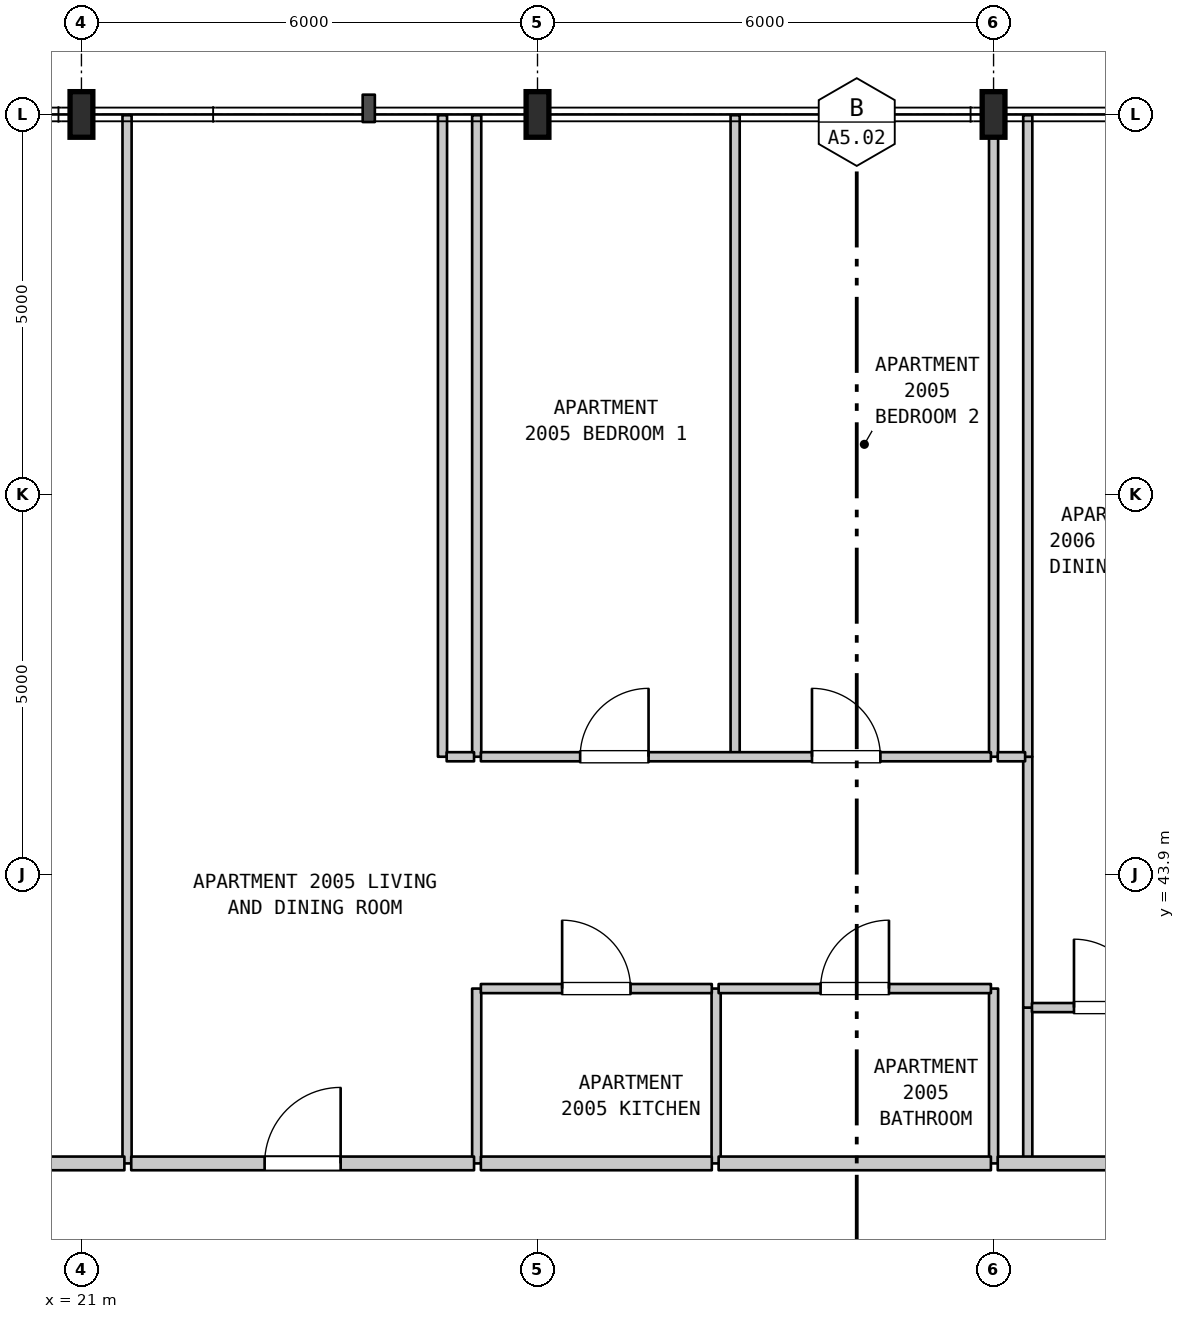
"""IFC4 building model, lengths in metres.
Left out: names, types, materials, properties, quantities, classifications, styles, units other than length and angle.
Written with IfcOpenShell. Run it as: python <this file> out.ifc"""

import sys

from ifc_helpers import new_model, si_unit, direction, frame, frame_2d, origin, origin_2d, place, context, subcontext, project, spatial, rectangle, i_section, extrude, element, fill, save


model = new_model("IFC4")
c1 = context("Model", 3, precision=1e-05, world=origin(), true_north=direction((0.0, 1.0)))
c2 = subcontext(c1, "Body", "Model", "MODEL_VIEW")
j1 = project(units=[si_unit("LENGTHUNIT", "METRE"), si_unit("PLANEANGLEUNIT", "RADIAN")], contexts=[c1])
p1 = place(None, origin())
s1 = spatial("IfcSite", under=j1, at=p1, CompositionType="ELEMENT")
p2 = place(p1, origin())
s2 = spatial("IfcBuilding", under=s1, at=p2, CompositionType="ELEMENT")
p3 = place(p2, frame((0.0, 0.0, 86.4)))
s3 = spatial("IfcBuildingStorey", under=s2, at=p3, CompositionType="ELEMENT", Elevation=86.4)
for number, where, z_axis, x_axis in (
    (1, (21.0, 53.9, 0.0), (0.0, 0.0, 1.0), (1.0, 0.0, 0.0)),
    (2, (27.0, 53.9, 0.0), (0.0, 0.0, 1.0), (1.0, 0.0, 0.0)),
    (3, (33.0, 53.9, 0.0), (0.0, 0.0, 1.0), (1.0, 0.0, 0.0)),
):
    element("IfcColumn", number, at=place(p3, frame(where, z_axis=z_axis, x_axis=x_axis)), inside=s3, PredefinedType="COLUMN", context=c2, shape_type="SweptSolid", body=[
        extrude(i_section(OverallWidth=0.3, OverallDepth=0.6, WebThickness=0.015, FlangeThickness=0.03, FilletRadius=0.027, at=origin_2d()), origin(), (0.0, 0.0, 1.0), 4.5),
    ])
p4 = place(p3, frame((21.6, 40.1, 0.0), z_axis=(0.0, 0.0, 1.0), x_axis=(0.0, 1.0, 0.0)))
e4 = element("IfcWall", 4, at=p4, inside=s3, PredefinedType="PARTITIONING", context=c2, shape_type="SweptSolid", body=[
    extrude(rectangle(XDim=13.79, YDim=0.12, at=frame_2d((6.895, 0.0))), origin(), (0.0, 0.0, 1.0), 4.185),
])
p5 = place(p3, frame((25.75, 45.45, 0.0), z_axis=(0.0, 0.0, 1.0), x_axis=(0.0, 1.0, 0.0)))
e5 = element("IfcWall", 5, at=p5, inside=s3, PredefinedType="PARTITIONING", context=c2, shape_type="SweptSolid", body=[
    extrude(rectangle(XDim=8.44, YDim=0.12, at=frame_2d((4.22, 0.0))), origin(), (0.0, 0.0, 1.0), 4.185),
])
p6 = place(p3, frame((26.2, 40.1, 0.0), z_axis=(0.0, 0.0, 1.0), x_axis=(0.0, 1.0, 0.0)))
e6 = element("IfcWall", 6, at=p6, inside=s3, PredefinedType="PARTITIONING", context=c2, shape_type="SweptSolid", body=[
    extrude(rectangle(XDim=2.3, YDim=0.12, at=frame_2d((1.15, 0.0))), origin(), (0.0, 0.0, 1.0), 4.185),
])
p7 = place(p3, frame((26.2, 45.45, 0.0), z_axis=(0.0, 0.0, 1.0), x_axis=(0.0, 1.0, 0.0)))
e7 = element("IfcWall", 7, at=p7, inside=s3, PredefinedType="PARTITIONING", context=c2, shape_type="SweptSolid", body=[
    extrude(rectangle(XDim=8.44, YDim=0.12, at=frame_2d((4.22, 0.0))), origin(), (0.0, 0.0, 1.0), 4.185),
])
p8 = place(p3, frame((29.35, 40.1, 0.0), z_axis=(0.0, 0.0, 1.0), x_axis=(0.0, 1.0, 0.0)))
e8 = element("IfcWall", 8, at=p8, inside=s3, PredefinedType="PARTITIONING", context=c2, shape_type="SweptSolid", body=[
    extrude(rectangle(XDim=2.3, YDim=0.12, at=frame_2d((1.15, 0.0))), origin(), (0.0, 0.0, 1.0), 4.185),
])
p9 = place(p3, frame((29.6, 45.45, 0.0), z_axis=(0.0, 0.0, 1.0), x_axis=(0.0, 1.0, 0.0)))
e9 = element("IfcWall", 9, at=p9, inside=s3, PredefinedType="PARTITIONING", context=c2, shape_type="SweptSolid", body=[
    extrude(rectangle(XDim=8.44, YDim=0.12, at=frame_2d((4.22, 0.0))), origin(), (0.0, 0.0, 1.0), 4.185),
])
p10 = place(p3, frame((33.0, 40.1, 0.0), z_axis=(0.0, 0.0, 1.0), x_axis=(0.0, 1.0, 0.0)))
e10 = element("IfcWall", 10, at=p10, inside=s3, PredefinedType="PARTITIONING", context=c2, shape_type="SweptSolid", body=[
    extrude(rectangle(XDim=2.3, YDim=0.12, at=frame_2d((1.15, 0.0))), origin(), (0.0, 0.0, 1.0), 3.585),
])
p11 = place(p3, frame((33.0, 45.45, 0.0), z_axis=(0.0, 0.0, 1.0), x_axis=(0.0, 1.0, 0.0)))
e11 = element("IfcWall", 11, at=p11, inside=s3, PredefinedType="PARTITIONING", context=c2, shape_type="SweptSolid", body=[
    extrude(rectangle(XDim=8.44, YDim=0.12, at=frame_2d((4.22, 0.0))), origin(), (0.0, 0.0, 1.0), 3.585),
])
p12 = place(p3, frame((33.45, 40.1, 0.0), z_axis=(0.0, 0.0, 1.0), x_axis=(0.0, 1.0, 0.0)))
e12 = element("IfcWall", 12, at=p12, inside=s3, PredefinedType="PARTITIONING", context=c2, shape_type="SweptSolid", body=[
    extrude(rectangle(XDim=2.05, YDim=0.12, at=frame_2d((1.025, 0.0))), origin(), (0.0, 0.0, 1.0), 4.185),
])
p13 = place(p3, frame((33.45, 42.15, 0.0), z_axis=(0.0, 0.0, 1.0), x_axis=(0.0, 1.0, 0.0)))
e13 = element("IfcWall", 13, at=p13, inside=s3, PredefinedType="PARTITIONING", context=c2, shape_type="SweptSolid", body=[
    extrude(rectangle(XDim=3.3, YDim=0.12, at=frame_2d((1.65, 0.0))), origin(), (0.0, 0.0, 1.0), 4.185),
])
p14 = place(p3, frame((33.45, 45.45, 0.0), z_axis=(0.0, 0.0, 1.0), x_axis=(0.0, 1.0, 0.0)))
e14 = element("IfcWall", 14, at=p14, inside=s3, PredefinedType="PARTITIONING", context=c2, shape_type="SweptSolid", body=[
    extrude(rectangle(XDim=8.44, YDim=0.12, at=frame_2d((4.22, 0.0))), origin(), (0.0, 0.0, 1.0), 4.185),
])
p15 = place(p3, frame((19.155, 40.1, 0.0), z_axis=(0.0, 0.0, 1.0), x_axis=(1.0, 0.0, 0.0)))
e15 = element("IfcWall", 15, at=p15, inside=s3, PredefinedType="STANDARD", context=c2, shape_type="SweptSolid", body=[
    extrude(rectangle(XDim=2.41, YDim=0.18, at=frame_2d((1.205, 0.0))), origin(), (0.0, 0.0, 1.0), 4.185),
])
p16 = place(p3, frame((21.655, 40.1, 0.0), z_axis=(0.0, 0.0, 1.0), x_axis=(1.0, 0.0, 0.0)))
e16 = element("IfcWall", 16, at=p16, inside=s3, PredefinedType="STANDARD", context=c2, shape_type="SweptSolid", body=[
    extrude(rectangle(XDim=4.51, YDim=0.18, at=frame_2d((2.255, 0.0))), origin(), (0.0, 0.0, 1.0), 4.185),
])
p17 = place(p16, frame((1.755, 0.0, 0.0)))
e17 = element("IfcOpeningElement", 17, at=p17, cuts=e16, PredefinedType="OPENING", context=c2, shape_type="SweptSolid", body=[
    extrude(rectangle(XDim=1.0, YDim=2.15, at=frame_2d((0.5, 1.075))), frame((0.0, 0.1, 0.0), z_axis=(0.0, -1.0, 0.0), x_axis=(1.0, 0.0, 0.0)), (0.0, 0.0, 1.0), 0.2),
])
p18 = place(p3, frame((26.255, 40.1, 0.0), z_axis=(0.0, 0.0, 1.0), x_axis=(1.0, 0.0, 0.0)))
e18 = element("IfcWall", 18, at=p18, inside=s3, PredefinedType="STANDARD", context=c2, shape_type="SweptSolid", body=[
    extrude(rectangle(XDim=3.038, YDim=0.18, at=frame_2d((1.519, 0.0))), origin(), (0.0, 0.0, 1.0), 4.185),
])
p19 = place(p3, frame((29.383, 40.1, 0.0), z_axis=(0.0, 0.0, 1.0), x_axis=(1.0, 0.0, 0.0)))
e19 = element("IfcWall", 19, at=p19, inside=s3, PredefinedType="STANDARD", context=c2, shape_type="SweptSolid", body=[
    extrude(rectangle(XDim=3.582, YDim=0.18, at=frame_2d((1.791, 0.0))), origin(), (0.0, 0.0, 1.0), 4.185),
])
p20 = place(p3, frame((33.055, 40.1, 0.0), z_axis=(0.0, 0.0, 1.0), x_axis=(1.0, 0.0, 0.0)))
e20 = element("IfcWall", 20, at=p20, inside=s3, PredefinedType="STANDARD", context=c2, shape_type="SweptSolid", body=[
    extrude(rectangle(XDim=5.545, YDim=0.18, at=frame_2d((2.772, 0.0))), origin(), (0.0, 0.0, 1.0), 4.185),
])
p21 = place(p20, frame((2.435, 0.0, 0.0)))
e21 = element("IfcOpeningElement", 21, at=p21, cuts=e20, PredefinedType="OPENING", context=c2, shape_type="SweptSolid", body=[
    extrude(rectangle(XDim=1.0, YDim=2.15, at=frame_2d((0.5, 1.075))), frame((0.0, 0.1, 0.0), z_axis=(0.0, -1.0, 0.0), x_axis=(1.0, 0.0, 0.0)), (0.0, 0.0, 1.0), 0.2),
])
p22 = place(p3, frame((33.505, 42.15, 0.0), z_axis=(0.0, 0.0, 1.0), x_axis=(1.0, 0.0, 0.0)))
e22 = element("IfcWall", 22, at=p22, inside=s3, PredefinedType="PARTITIONING", context=c2, shape_type="SweptSolid", body=[
    extrude(rectangle(XDim=2.16, YDim=0.12, at=frame_2d((1.08, 0.0))), origin(), (0.0, 0.0, 1.0), 4.185),
])
p23 = place(p22, frame((0.553, 0.0, 0.0)))
e23 = element("IfcOpeningElement", 23, at=p23, cuts=e22, PredefinedType="OPENING", context=c2, shape_type="SweptSolid", body=[
    extrude(rectangle(XDim=0.9, YDim=2.15, at=frame_2d((0.45, 1.075))), frame((0.0, 0.07, 0.0), z_axis=(0.0, -1.0, 0.0), x_axis=(1.0, 0.0, 0.0)), (0.0, 0.0, 1.0), 0.14),
])
p24 = place(p3, frame((26.255, 42.4, 0.0), z_axis=(0.0, 0.0, 1.0), x_axis=(1.0, 0.0, 0.0)))
e24 = element("IfcWall", 24, at=p24, inside=s3, PredefinedType="PARTITIONING", context=c2, shape_type="SweptSolid", body=[
    extrude(rectangle(XDim=3.038, YDim=0.12, at=frame_2d((1.519, 0.0))), origin(), (0.0, 0.0, 1.0), 4.185),
])
p25 = place(p24, frame((1.069, 0.0, 0.0)))
e25 = element("IfcOpeningElement", 25, at=p25, cuts=e24, PredefinedType="OPENING", context=c2, shape_type="SweptSolid", body=[
    extrude(rectangle(XDim=0.9, YDim=2.15, at=frame_2d((0.45, 1.075))), frame((0.0, 0.07, 0.0), z_axis=(0.0, -1.0, 0.0), x_axis=(1.0, 0.0, 0.0)), (0.0, 0.0, 1.0), 0.14),
])
p26 = place(p3, frame((29.383, 42.4, 0.0), z_axis=(0.0, 0.0, 1.0), x_axis=(1.0, 0.0, 0.0)))
e26 = element("IfcWall", 26, at=p26, inside=s3, PredefinedType="PARTITIONING", context=c2, shape_type="SweptSolid", body=[
    extrude(rectangle(XDim=3.582, YDim=0.12, at=frame_2d((1.791, 0.0))), origin(), (0.0, 0.0, 1.0), 4.185),
])
p27 = place(p26, frame((1.341, 0.0, 0.0)))
e27 = element("IfcOpeningElement", 27, at=p27, cuts=e26, PredefinedType="OPENING", context=c2, shape_type="SweptSolid", body=[
    extrude(rectangle(XDim=0.9, YDim=2.1, at=frame_2d((0.45, 1.05))), frame((0.0, 0.07, 0.0), z_axis=(0.0, -1.0, 0.0), x_axis=(1.0, 0.0, 0.0)), (0.0, 0.0, 1.0), 0.14),
])
p28 = place(p3, frame((25.805, 45.45, 0.0), z_axis=(0.0, 0.0, 1.0), x_axis=(1.0, 0.0, 0.0)))
e28 = element("IfcWall", 28, at=p28, inside=s3, PredefinedType="PARTITIONING", context=c2, shape_type="SweptSolid", body=[
    extrude(rectangle(XDim=0.36, YDim=0.12, at=frame_2d((0.18, 0.0))), origin(), (0.0, 0.0, 1.0), 4.185),
])
p29 = place(p3, frame((26.255, 45.45, 0.0), z_axis=(0.0, 0.0, 1.0), x_axis=(1.0, 0.0, 0.0)))
e29 = element("IfcWall", 29, at=p29, inside=s3, PredefinedType="PARTITIONING", context=c2, shape_type="SweptSolid", body=[
    extrude(rectangle(XDim=6.71, YDim=0.12, at=frame_2d((3.355, 0.0))), origin(), (0.0, 0.0, 1.0), 4.185),
])
p30 = place(p29, frame((1.306, 0.0, 0.0)))
e30 = element("IfcOpeningElement", 30, at=p30, cuts=e29, PredefinedType="OPENING", context=c2, shape_type="SweptSolid", body=[
    extrude(rectangle(XDim=0.9, YDim=2.15, at=frame_2d((0.45, 1.075))), frame((0.0, 0.07, 0.0), z_axis=(0.0, -1.0, 0.0), x_axis=(1.0, 0.0, 0.0)), (0.0, 0.0, 1.0), 0.14),
])
p31 = place(p29, frame((4.356, 0.0, 0.0)))
e31 = element("IfcOpeningElement", 31, at=p31, cuts=e29, PredefinedType="OPENING", context=c2, shape_type="SweptSolid", body=[
    extrude(rectangle(XDim=0.9, YDim=2.15, at=frame_2d((0.45, 1.075))), frame((0.0, 0.07, 0.0), z_axis=(0.0, -1.0, 0.0), x_axis=(1.0, 0.0, 0.0)), (0.0, 0.0, 1.0), 0.14),
])
p32 = place(p3, frame((33.055, 45.45, 0.0), z_axis=(0.0, 0.0, 1.0), x_axis=(1.0, 0.0, 0.0)))
e32 = element("IfcWall", 32, at=p32, inside=s3, PredefinedType="PARTITIONING", context=c2, shape_type="SweptSolid", body=[
    extrude(rectangle(XDim=0.36, YDim=0.12, at=frame_2d((0.18, 0.0))), origin(), (0.0, 0.0, 1.0), 4.185),
])
p33 = place(p17, origin())
e33 = element("IfcDoor", 33, at=p33, inside=s3, OperationType="SINGLE_SWING_RIGHT", PredefinedType="DOOR", context=c2, shape_type="SweptSolid", body=[
    extrude(rectangle(XDim=1.0, YDim=2.15, at=frame_2d((0.5, 1.075))), frame((0.0, 0.025, 0.0), z_axis=(0.0, -1.0, 0.0), x_axis=(1.0, 0.0, 0.0)), (0.0, 0.0, 1.0), 0.05),
])
fill(e17, e33)
p34 = place(p23, origin())
e34 = element("IfcDoor", 34, at=p34, inside=s3, OperationType="SINGLE_SWING_LEFT", PredefinedType="DOOR", context=c2, shape_type="SweptSolid", body=[
    extrude(rectangle(XDim=0.9, YDim=2.15, at=frame_2d((0.45, 1.075))), frame((0.0, 0.025, 0.0), z_axis=(0.0, -1.0, 0.0), x_axis=(1.0, 0.0, 0.0)), (0.0, 0.0, 1.0), 0.05),
])
fill(e23, e34)
p35 = place(p25, origin())
e35 = element("IfcDoor", 35, at=p35, inside=s3, OperationType="SINGLE_SWING_LEFT", PredefinedType="DOOR", context=c2, shape_type="SweptSolid", body=[
    extrude(rectangle(XDim=0.9, YDim=2.15, at=frame_2d((0.45, 1.075))), frame((0.0, 0.025, 0.0), z_axis=(0.0, -1.0, 0.0), x_axis=(1.0, 0.0, 0.0)), (0.0, 0.0, 1.0), 0.05),
])
fill(e25, e35)
p36 = place(p27, origin())
e36 = element("IfcDoor", 36, at=p36, inside=s3, OperationType="SINGLE_SWING_RIGHT", PredefinedType="DOOR", context=c2, shape_type="SweptSolid", body=[
    extrude(rectangle(XDim=0.9, YDim=2.1, at=frame_2d((0.45, 1.05))), frame((0.0, 0.025, 0.0), z_axis=(0.0, -1.0, 0.0), x_axis=(1.0, 0.0, 0.0)), (0.0, 0.0, 1.0), 0.05),
])
fill(e27, e36)
p37 = place(p30, origin())
e37 = element("IfcDoor", 37, at=p37, inside=s3, OperationType="SINGLE_SWING_RIGHT", PredefinedType="DOOR", context=c2, shape_type="SweptSolid", body=[
    extrude(rectangle(XDim=0.9, YDim=2.15, at=frame_2d((0.45, 1.075))), frame((0.0, 0.025, 0.0), z_axis=(0.0, -1.0, 0.0), x_axis=(1.0, 0.0, 0.0)), (0.0, 0.0, 1.0), 0.05),
])
fill(e30, e37)
p38 = place(p31, origin())
e38 = element("IfcDoor", 38, at=p38, inside=s3, OperationType="SINGLE_SWING_LEFT", PredefinedType="DOOR", context=c2, shape_type="SweptSolid", body=[
    extrude(rectangle(XDim=0.9, YDim=2.15, at=frame_2d((0.45, 1.075))), frame((0.0, 0.025, 0.0), z_axis=(0.0, -1.0, 0.0), x_axis=(1.0, 0.0, 0.0)), (0.0, 0.0, 1.0), 0.05),
])
fill(e31, e38)
save(model, sys.argv[1])
